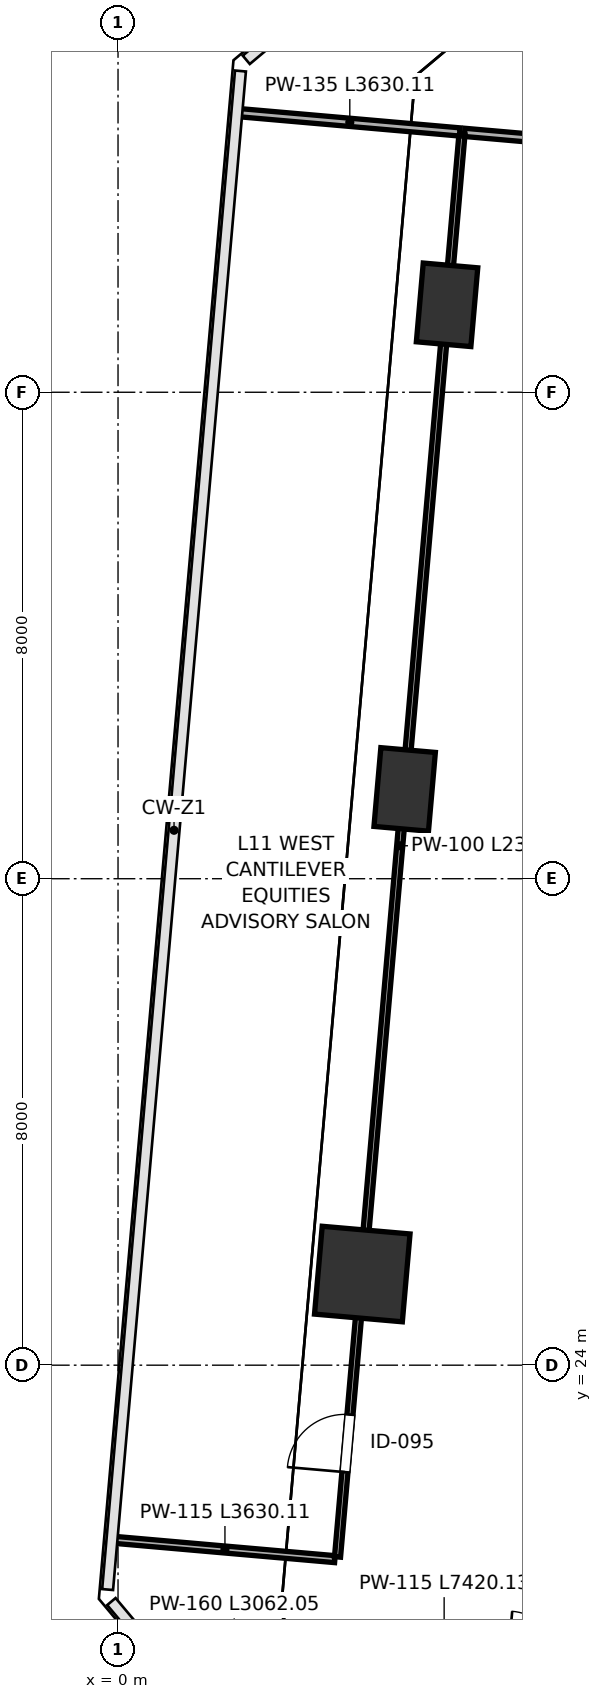
"""IFC4 building model, lengths in metres.
Left out: names, types, materials, properties, quantities, classifications, styles, units other than length and angle.
Written with IfcOpenShell. Run it as: python <this file> out.ifc"""

import sys

from ifc_helpers import new_model, si_unit, direction, frame, frame_2d, origin, origin_2d, place, context, subcontext, project, spatial, rectangle, extrude, clip, halfspace, source, transform, mapped, element, fill, save


model = new_model("IFC4")
c1 = context("Model", 3, precision=1e-05, world=origin(), true_north=direction((0.0, 1.0)))
c2 = subcontext(c1, "Body", "Model", "MODEL_VIEW")
j1 = project(units=[si_unit("LENGTHUNIT", "METRE"), si_unit("PLANEANGLEUNIT", "RADIAN")], contexts=[c1])
p1 = place(None, origin())
s1 = spatial("IfcSite", under=j1, at=p1, CompositionType="ELEMENT")
p2 = place(p1, origin())
s2 = spatial("IfcBuilding", under=s1, at=p2, CompositionType="ELEMENT")
p3 = place(p2, frame((0.0, 0.0, 52.0)))
s3 = spatial("IfcBuildingStorey", under=s2, at=p3, CompositionType="ELEMENT", Elevation=52.0)
p4 = place(p3, frame((4.017, 25.499, 0.0), z_axis=(-0.028583638075, 0.079517248474, 0.996423596082), x_axis=(0.966843928128, 0.255261791481, 0.007364540188)))
e1 = element("IfcColumn", 1, at=p4, inside=s3, PredefinedType="COLUMN", context=c2, shape_type="Clipping", body=[
    clip(clip(extrude(rectangle(XDim=1.45, YDim=1.45, at=origin_2d()), origin(), (0.0, 0.0, 1.0), 4.817), halfspace(frame((0.0, 0.0, 0.067), z_axis=(0.0, 0.0, -1.0), x_axis=(1.0, 0.0, 0.0)), False)), halfspace(frame((0.0, 0.0, 4.75), z_axis=(0.0, 0.0, 1.0), x_axis=(1.0, 0.0, 0.0)), False)),
])
p5 = place(p3, frame((4.714, 33.469, 0.0), z_axis=(0.007505597669, 0.076019533144, 0.997078079482), x_axis=(0.982835962213, -0.184361453929, 0.006657753778)))
e2 = element("IfcColumn", 2, at=p5, inside=s3, PredefinedType="PILASTER", context=c2, shape_type="Clipping", body=[
    clip(clip(extrude(rectangle(XDim=0.9, YDim=1.3, at=origin_2d()), origin(), (0.0, 0.0, 1.0), 4.814), halfspace(frame((0.0, 0.0, 0.053), z_axis=(0.0, 0.0, -1.0), x_axis=(1.0, 0.0, 0.0)), False)), halfspace(frame((0.0, 0.0, 4.761), z_axis=(0.0, 0.0, 1.0), x_axis=(1.0, 0.0, 0.0)), False)),
])
p6 = place(p3, frame((5.411, 41.438, 0.0), z_axis=(0.0435342962, 0.072422013119, 0.996423512905), x_axis=(0.809065713617, -0.587672045735, 0.007364625673)))
e3 = element("IfcColumn", 3, at=p6, inside=s3, PredefinedType="PILASTER", context=c2, shape_type="Clipping", body=[
    clip(clip(extrude(rectangle(XDim=0.9, YDim=1.3, at=origin_2d()), origin(), (0.0, 0.0, 1.0), 4.817), halfspace(frame((0.0, 0.0, 0.059), z_axis=(0.0, 0.0, -1.0), x_axis=(1.0, 0.0, 0.0)), False)), halfspace(frame((0.0, 0.0, 4.758), z_axis=(0.0, 0.0, 1.0), x_axis=(1.0, 0.0, 0.0)), False)),
])
p7 = place(p3, frame((5.7, 44.274, 0.0), z_axis=(0.0, 0.0, 1.0), x_axis=(0.996195324028, -0.087148587968, 0.0)))
e4 = element("IfcWall", 4, at=p7, inside=s3, PredefinedType="PARTITIONING", context=c2, shape_type="SweptSolid", body=[
    extrude(rectangle(XDim=25.07, YDim=0.135, at=frame_2d((12.535, 0.0))), origin(), (0.0, 0.0, 1.0), 4.56),
])
p8 = place(p7, frame((1.05, 0.0, 0.0)))
e5 = element("IfcOpeningElement", 5, at=p8, cuts=e4, PredefinedType="OPENING", context=c2, shape_type="SweptSolid", body=[
    extrude(rectangle(XDim=0.95, YDim=2.15, at=frame_2d((0.475, 1.075))), frame((0.0, 0.078, 0.0), z_axis=(0.0, -1.0, 0.0), x_axis=(1.0, 0.0, 0.0)), (0.0, 0.0, 1.0), 0.155),
])
p9 = place(p3, frame((-0.05, 21.127, 0.0), z_axis=(0.0, 0.0, 1.0), x_axis=(0.996194520424, -0.087157773474, 0.0)))
e6 = element("IfcWall", 6, at=p9, inside=s3, PredefinedType="PARTITIONING", context=c2, shape_type="SweptSolid", body=[
    extrude(rectangle(XDim=3.63, YDim=0.115, at=frame_2d((1.815, 0.0))), origin(), (0.0, 0.0, 1.0), 4.56),
])
p10 = place(p3, frame((3.61, 20.847, 0.0), z_axis=(0.0, 0.0, 1.0), x_axis=(0.087153664928, 0.996194879875, 0.0)))
e7 = element("IfcWall", 7, at=p10, inside=s3, PredefinedType="PARTITIONING", context=c2, shape_type="SweptSolid", body=[
    extrude(rectangle(XDim=23.48, YDim=0.1, at=frame_2d((11.74, 0.0))), origin(), (0.0, 0.0, 1.0), 3.395),
])
p11 = place(p10, frame((1.4, 0.0, 0.0)))
e8 = element("IfcOpeningElement", 8, at=p11, cuts=e7, PredefinedType="OPENING", context=c2, shape_type="SweptSolid", body=[
    extrude(rectangle(XDim=0.95, YDim=2.15, at=frame_2d((0.475, 1.075))), frame((0.0, 0.06, 0.0), z_axis=(0.0, -1.0, 0.0), x_axis=(1.0, 0.0, 0.0)), (0.0, 0.0, 1.0), 0.12),
])
p12 = place(p3, frame((2.004, 44.597, 0.0), z_axis=(0.0, 0.0, 1.0), x_axis=(0.996194520424, -0.087157773474, 0.0)))
e9 = element("IfcWall", 9, at=p12, inside=s3, PredefinedType="PARTITIONING", context=c2, shape_type="SweptSolid", body=[
    extrude(rectangle(XDim=3.63, YDim=0.135, at=frame_2d((1.815, 0.0))), origin(), (0.0, 0.0, 1.0), 4.56),
])
m1 = source(origin(), c2, "Body", "SweptSolid", [
    extrude(rectangle(XDim=0.95, YDim=2.15, at=frame_2d((0.475, 1.075))), frame((0.0, 0.025, 0.0), z_axis=(0.0, -1.0, 0.0), x_axis=(1.0, 0.0, 0.0)), (0.0, 0.0, 1.0), 0.05),
])
p13 = place(p11, origin())
e10 = element("IfcDoor", 10, at=p13, inside=s3, OperationType="SINGLE_SWING_LEFT", PredefinedType="DOOR", context=c2, shape_type="MappedRepresentation", body=[
    mapped(m1, transform((0.0, 0.0, 0.0), scale=1.0)),
])
fill(e8, e10)
save(model, sys.argv[1])
